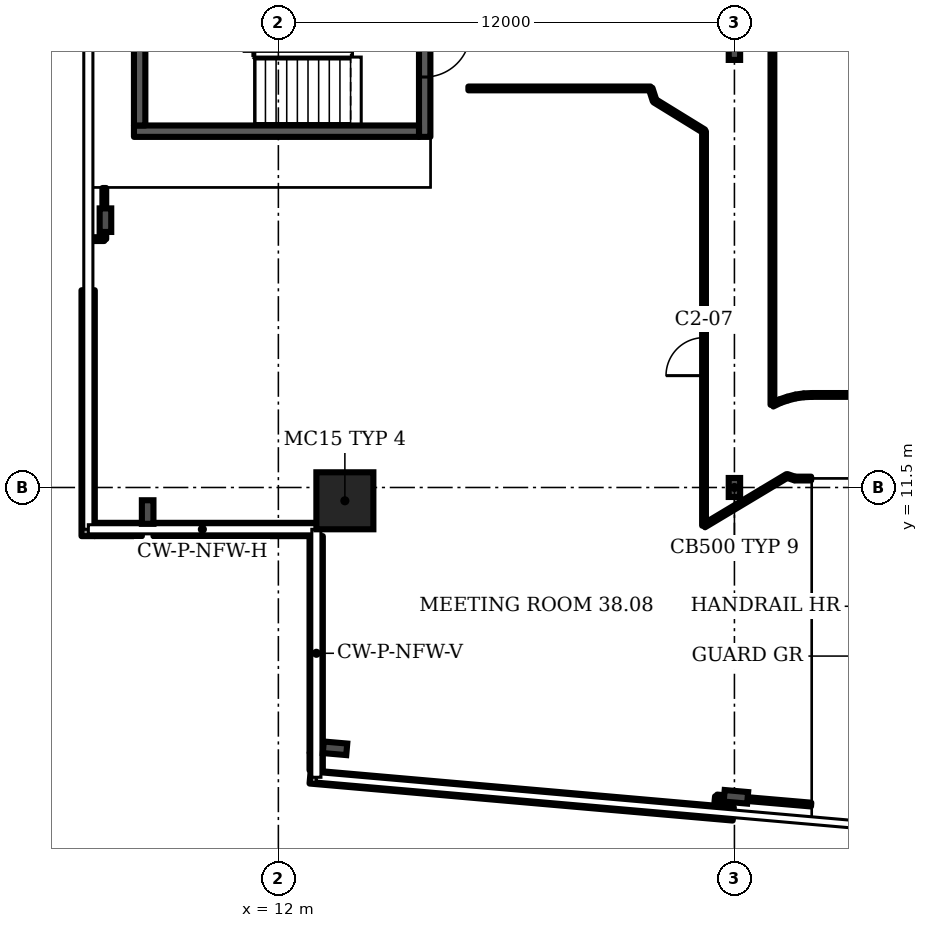
"""IFC4 building model, lengths in metres.
Left out: names, types, materials, properties, quantities, classifications, styles, units other than length and angle.
Written with IfcOpenShell. Run it as: python <this file> out.ifc"""

import sys

from ifc_helpers import new_model, si_unit, direction, frame, frame_2d, origin, origin_2d, place, context, subcontext, project, spatial, rectangle, i_section, extrude, element, fill, save


model = new_model("IFC4")
c1 = context("Model", 3, precision=1e-05, world=origin(), true_north=direction((0.0, 1.0)))
c2 = subcontext(c1, "Body", "Model", "MODEL_VIEW")
j1 = project(units=[si_unit("LENGTHUNIT", "METRE"), si_unit("PLANEANGLEUNIT", "RADIAN")], contexts=[c1])
p1 = place(None, origin())
s1 = spatial("IfcSite", under=j1, at=p1, CompositionType="ELEMENT")
p2 = place(p1, origin())
s2 = spatial("IfcBuilding", under=s1, at=p2, CompositionType="ELEMENT")
p3 = place(p2, frame((0.0, 0.0, 159.1)))
s3 = spatial("IfcBuildingStorey", under=s2, at=p3, CompositionType="ELEMENT", Elevation=159.1)
p4 = place(p3, frame((13.75, 11.15, 0.0), z_axis=(0.0, 0.0, 1.0), x_axis=(1.0, 0.0, 0.0)))
e1 = element("IfcColumn", 1, at=p4, inside=s3, PredefinedType="COLUMN", context=c2, shape_type="SweptSolid", body=[
    extrude(rectangle(XDim=1.5, YDim=1.5, at=origin_2d()), origin(), (0.0, 0.0, 1.0), 3.6),
])
for number, where, z_axis, x_axis in (
    (2, (13.491, 4.637, 0.0), (0.0, 0.0, 1.0), (-0.087, -0.996, 0.0)),
    (3, (24.039, 3.361, 0.0), (0.0, 0.0, 1.0), (-0.087, -0.996, 0.0)),
    (4, (7.45, 18.533, 0.0), (0.0, 0.0, 1.0), (-1.0, 0.0, 0.0)),
    (5, (8.561, 10.854, 0.0), (0.0, 0.0, 1.0), (-1.0, 0.0, 0.0)),
):
    element("IfcColumn", number, at=place(p3, frame(where, z_axis=z_axis, x_axis=x_axis)), inside=s3, PredefinedType="COLUMN", context=c2, shape_type="SweptSolid", body=[
        extrude(i_section(OverallWidth=0.305, OverallDepth=0.62, WebThickness=0.021, FlangeThickness=0.04, FilletRadius=0.027, at=origin_2d()), origin(), (0.0, 0.0, 1.0), 3.6),
    ])
for number, where, z_axis, x_axis in (
    (6, (24.0, 11.5, 0.0), (0.0, 0.0, 1.0), (1.0, 0.0, 0.0)),
    (7, (24.0, 23.0, 0.0), (0.0, 0.0, 1.0), (1.0, 0.0, 0.0)),
):
    element("IfcColumn", number, at=place(p3, frame(where, z_axis=z_axis, x_axis=x_axis)), inside=s3, PredefinedType="COLUMN", context=c2, shape_type="SweptSolid", body=[
        extrude(i_section(OverallWidth=0.3, OverallDepth=0.5, WebThickness=0.014, FlangeThickness=0.028, FilletRadius=0.027, at=origin_2d()), origin(), (0.0, 0.0, 1.0), 3.6),
    ])
p5 = place(p3, frame((12.835, 3.885, 0.0), z_axis=(0.0, 0.0, 1.0), x_axis=(0.996199, -0.087154, 0.0)))
e8 = element("IfcWall", 8, at=p5, inside=s3, PredefinedType="SOLIDWALL", context=c2, shape_type="SweptSolid", body=[
    extrude(rectangle(XDim=11.177, YDim=0.35, at=frame_2d((5.588, 0.0))), origin(), (0.0, 0.0, 1.0), 1.0),
])
p6 = place(p3, frame((6.995, 16.69, 0.0), z_axis=(0.0, 0.0, 1.0), x_axis=(0.0, -1.0, 0.0)))
e9 = element("IfcWall", 9, at=p6, inside=s3, PredefinedType="SOLIDWALL", context=c2, shape_type="SweptSolid", body=[
    extrude(rectangle(XDim=6.47, YDim=0.35, at=frame_2d((3.235, 0.0))), origin(), (0.0, 0.0, 1.0), 1.0),
])
p7 = place(p3, frame((7.17, 10.395, 0.0), z_axis=(0.0, 0.0, 1.0), x_axis=(1.0, 0.0, 0.0)))
e10 = element("IfcWall", 10, at=p7, inside=s3, PredefinedType="SOLIDWALL", context=c2, shape_type="SweptSolid", body=[
    extrude(rectangle(XDim=1.238, YDim=0.35, at=frame_2d((0.619, 0.0))), origin(), (0.0, 0.0, 1.0), 1.0),
])
p8 = place(p3, frame((8.713, 10.395, 0.0), z_axis=(0.0, 0.0, 1.0), x_axis=(1.0, 0.0, 0.0)))
e11 = element("IfcWall", 11, at=p8, inside=s3, PredefinedType="SOLIDWALL", context=c2, shape_type="SweptSolid", body=[
    extrude(rectangle(XDim=4.287, YDim=0.35, at=frame_2d((2.143, 0.0))), origin(), (0.0, 0.0, 1.0), 1.0),
])
p9 = place(p3, frame((12.995, 10.22, 0.0), z_axis=(0.0, 0.0, 1.0), x_axis=(0.0, -1.0, 0.0)))
e12 = element("IfcWall", 12, at=p9, inside=s3, PredefinedType="SOLIDWALL", context=c2, shape_type="SweptSolid", body=[
    extrude(rectangle(XDim=5.693, YDim=0.35, at=frame_2d((2.847, 0.0))), origin(), (0.0, 0.0, 1.0), 1.0),
])
p10 = place(p3, frame((12.995, 4.512, 0.0), z_axis=(0.0, 0.0, 1.0), x_axis=(0.0, -1.0, 0.0)))
e13 = element("IfcWall", 13, at=p10, inside=s3, PredefinedType="SOLIDWALL", context=c2, shape_type="SweptSolid", body=[
    extrude(rectangle(XDim=0.454, YDim=0.35, at=frame_2d((0.227, 0.0))), origin(), (0.0, 0.0, 1.0), 1.0),
])
p11 = place(p3, frame((15.85, 20.725, 0.0), z_axis=(0.0, 0.0, 1.0), x_axis=(0.0, 1.0, 0.0)))
e14 = element("IfcWall", 14, at=p11, inside=s3, PredefinedType="SHEAR", context=c2, shape_type="SweptSolid", body=[
    extrude(rectangle(XDim=4.35, YDim=0.3, at=frame_2d((2.175, 0.0))), origin(), (0.0, 0.0, 1.0), 3.2),
])
p12 = place(p11, frame((1.575, 0.0, 0.0)))
e15 = element("IfcOpeningElement", 15, at=p12, cuts=e14, PredefinedType="OPENING", context=c2, shape_type="SweptSolid", body=[
    extrude(rectangle(XDim=1.2, YDim=2.1, at=frame_2d((0.6, 1.05))), frame((0.0, 0.16, 0.0), z_axis=(0.0, -1.0, 0.0), x_axis=(1.0, 0.0, 0.0)), (0.0, 0.0, 1.0), 0.32),
])
p13 = place(p3, frame((7.02, 18.035, 0.0), z_axis=(0.0, 0.0, 1.0), x_axis=(1.0, 0.0, 0.0)))
e16 = element("IfcWall", 16, at=p13, inside=s3, PredefinedType="PARTITIONING", context=c2, shape_type="SweptSolid", body=[
    extrude(rectangle(XDim=0.4, YDim=0.1, at=frame_2d((0.2, 0.0))), origin(), (0.0, 0.0, 1.0), 3.2),
])
p14 = place(p3, frame((7.42, 18.035, 0.0), z_axis=(0.0, 0.0, 1.0), x_axis=(0.0, 1.0, 0.0)))
e17 = element("IfcWall", 17, at=p14, inside=s3, PredefinedType="PARTITIONING", context=c2, shape_type="SweptSolid", body=[
    extrude(rectangle(XDim=1.345, YDim=0.1, at=frame_2d((0.672, 0.0))), origin(), (0.0, 0.0, 1.0), 2.58),
])
p15 = place(p3, frame((17.0, 22.0, 0.0), z_axis=(0.0, 0.0, 1.0), x_axis=(1.0, 0.0, 0.0)))
e18 = element("IfcWall", 18, at=p15, inside=s3, PredefinedType="PARTITIONING", context=c2, shape_type="SweptSolid", body=[
    extrude(rectangle(XDim=4.795, YDim=0.1, at=frame_2d((2.397, 0.0))), origin(), (0.0, 0.0, 1.0), 3.2),
])
p16 = place(p3, frame((21.9, 21.675, 0.0), z_axis=(0.0, 0.0, 1.0), x_axis=(-0.30742, 0.951572, 0.0)))
e19 = element("IfcWall", 19, at=p16, inside=s3, PredefinedType="PARTITIONING", context=c2, shape_type="SweptSolid", body=[
    extrude(rectangle(XDim=0.342, YDim=0.1, at=frame_2d((0.171, 0.0))), origin(), (0.0, 0.0, 1.0), 3.2),
])
p17 = place(p3, frame((23.2, 20.875, 0.0), z_axis=(0.0, 0.0, 1.0), x_axis=(-0.851649, 0.524104, 0.0)))
e20 = element("IfcWall", 20, at=p17, inside=s3, PredefinedType="PARTITIONING", context=c2, shape_type="SweptSolid", body=[
    extrude(rectangle(XDim=1.527, YDim=0.1, at=frame_2d((0.763, 0.0))), origin(), (0.0, 0.0, 1.0), 3.2),
])
p18 = place(p3, frame((23.2, 10.495, 0.0), z_axis=(0.0, 0.0, 1.0), x_axis=(0.857707, 0.514145, 0.0)))
e21 = element("IfcWall", 21, at=p18, inside=s3, PredefinedType="PARTITIONING", context=c2, shape_type="SweptSolid", body=[
    extrude(rectangle(XDim=2.548, YDim=0.1, at=frame_2d((1.274, 0.0))), origin(), (0.0, 0.0, 1.0), 3.2),
])
p19 = place(p3, frame((23.2, 10.495, 0.0), z_axis=(0.0, 0.0, 1.0), x_axis=(0.0, 1.0, 0.0)))
e22 = element("IfcWall", 22, at=p19, inside=s3, PredefinedType="PARTITIONING", context=c2, shape_type="SweptSolid", body=[
    extrude(rectangle(XDim=10.38, YDim=0.1, at=frame_2d((5.19, 0.0))), origin(), (0.0, 0.0, 1.0), 3.2),
])
p20 = place(p19, frame((3.948, 0.0, 0.0)))
e23 = element("IfcOpeningElement", 23, at=p20, cuts=e22, PredefinedType="OPENING", context=c2, shape_type="SweptSolid", body=[
    extrude(rectangle(XDim=1.0, YDim=2.1, at=frame_2d((0.5, 1.05))), frame((0.0, 0.06, 0.0), z_axis=(0.0, -1.0, 0.0), x_axis=(1.0, 0.0, 0.0)), (0.0, 0.0, 1.0), 0.12),
])
p21 = place(p3, frame((23.502, 2.976, 0.0), z_axis=(0.0, 0.0, 1.0), x_axis=(0.095654, 0.995419, 0.0)))
e24 = element("IfcWall", 24, at=p21, inside=s3, PredefinedType="PARTITIONING", context=c2, shape_type="SweptSolid", body=[
    extrude(rectangle(XDim=0.396, YDim=0.1, at=frame_2d((0.198, 0.0))), origin(), (0.0, 0.0, 1.0), 3.2),
])
p22 = place(p3, frame((25.0, 13.675, 0.0), z_axis=(0.0, 0.0, 1.0), x_axis=(0.0, 1.0, 0.0)))
e25 = element("IfcWall", 25, at=p22, inside=s3, PredefinedType="PARTITIONING", context=c2, shape_type="SweptSolid", body=[
    extrude(rectangle(XDim=11.825, YDim=0.1, at=frame_2d((5.913, 0.0))), origin(), (0.0, 0.0, 1.0), 3.2),
])
p23 = place(p3, frame((25.0, 13.675, 0.0), z_axis=(0.0, 0.0, 1.0), x_axis=(0.899103, 0.437736, 0.0)))
e26 = element("IfcWall", 26, at=p23, inside=s3, PredefinedType="PARTITIONING", context=c2, shape_type="SweptSolid", body=[
    extrude(rectangle(XDim=0.217, YDim=0.1, at=frame_2d((0.108, 0.0))), origin(), (0.0, 0.0, 1.0), 3.2),
])
p24 = place(p3, frame((25.195, 13.77, 0.0), z_axis=(0.0, 0.0, 1.0), x_axis=(0.94617, 0.32366, 0.0)))
e27 = element("IfcWall", 27, at=p24, inside=s3, PredefinedType="PARTITIONING", context=c2, shape_type="SweptSolid", body=[
    extrude(rectangle(XDim=0.217, YDim=0.1, at=frame_2d((0.108, 0.0))), origin(), (0.0, 0.0, 1.0), 3.2),
])
p25 = place(p3, frame((25.4, 13.84, 0.0), z_axis=(0.0, 0.0, 1.0), x_axis=(0.967508, 0.252833, 0.0)))
e28 = element("IfcWall", 28, at=p25, inside=s3, PredefinedType="PARTITIONING", context=c2, shape_type="SweptSolid", body=[
    extrude(rectangle(XDim=0.217, YDim=0.1, at=frame_2d((0.109, 0.0))), origin(), (0.0, 0.0, 1.0), 3.2),
])
p26 = place(p3, frame((25.59, 11.735, 0.0), z_axis=(0.0, 0.0, 1.0), x_axis=(1.0, 0.0, 0.0)))
e29 = element("IfcWall", 29, at=p26, inside=s3, PredefinedType="PARTITIONING", context=c2, shape_type="SweptSolid", body=[
    extrude(rectangle(XDim=0.429, YDim=0.1, at=frame_2d((0.215, 0.0))), origin(), (0.0, 0.0, 1.0), 3.2),
])
p27 = place(p3, frame((25.59, 11.735, 0.0), z_axis=(0.0, 0.0, 1.0), x_axis=(-0.946633, 0.322306, 0.0)))
e30 = element("IfcWall", 30, at=p27, inside=s3, PredefinedType="PARTITIONING", context=c2, shape_type="SweptSolid", body=[
    extrude(rectangle(XDim=0.217, YDim=0.1, at=frame_2d((0.108, 0.0))), origin(), (0.0, 0.0, 1.0), 3.2),
])
p28 = place(p3, frame((25.61, 13.895, 0.0), z_axis=(0.0, 0.0, 1.0), x_axis=(0.990372, 0.138427, 0.0)))
e31 = element("IfcWall", 31, at=p28, inside=s3, PredefinedType="PARTITIONING", context=c2, shape_type="SweptSolid", body=[
    extrude(rectangle(XDim=0.217, YDim=0.1, at=frame_2d((0.108, 0.0))), origin(), (0.0, 0.0, 1.0), 3.2),
])
p29 = place(p3, frame((25.825, 13.925, 0.0), z_axis=(0.0, 0.0, 1.0), x_axis=(0.998923, 0.046488, 0.0)))
e32 = element("IfcWall", 32, at=p29, inside=s3, PredefinedType="PARTITIONING", context=c2, shape_type="SweptSolid", body=[
    extrude(rectangle(XDim=0.215, YDim=0.1, at=frame_2d((0.108, 0.0))), origin(), (0.0, 0.0, 1.0), 3.2),
])
p30 = place(p3, frame((26.019, 3.157, 0.0), z_axis=(0.0, 0.0, 1.0), x_axis=(-0.996317, 0.085749, 0.0)))
e33 = element("IfcWall", 33, at=p30, inside=s3, PredefinedType="PARTITIONING", context=c2, shape_type="SweptSolid", body=[
    extrude(rectangle(XDim=2.489, YDim=0.1, at=frame_2d((1.244, 0.0))), origin(), (0.0, 0.0, 1.0), 2.58),
])
p31 = place(p3, frame((26.04, 13.935, 0.0), z_axis=(0.0, 0.0, 1.0), x_axis=(1.0, 0.0, 0.0)))
e34 = element("IfcWall", 34, at=p31, inside=s3, PredefinedType="PARTITIONING", context=c2, shape_type="SweptSolid", body=[
    extrude(rectangle(XDim=7.0, YDim=0.1, at=frame_2d((3.5, 0.0))), origin(), (0.0, 0.0, 1.0), 3.2),
])
p32 = place(p3, frame((8.2, 20.875, 0.0), z_axis=(0.0, 0.0, 1.0), x_axis=(1.0, 0.0, 0.0)))
e35 = element("IfcWall", 35, at=p32, inside=s3, PredefinedType="SHEAR", context=c2, shape_type="SweptSolid", body=[
    extrude(rectangle(XDim=7.5, YDim=0.3, at=frame_2d((3.75, 0.0))), origin(), (0.0, 0.0, 1.0), 3.2),
])
p33 = place(p3, frame((8.35, 21.025, 0.0), z_axis=(0.0, 0.0, 1.0), x_axis=(0.0, 1.0, 0.0)))
e36 = element("IfcWall", 36, at=p33, inside=s3, PredefinedType="SHEAR", context=c2, shape_type="SweptSolid", body=[
    extrude(rectangle(XDim=3.75, YDim=0.3, at=frame_2d((1.875, 0.0))), origin(), (0.0, 0.0, 1.0), 3.2),
])
p34 = place(p12, origin())
e37 = element("IfcDoor", 37, at=p34, inside=s3, OperationType="SINGLE_SWING_RIGHT", PredefinedType="DOOR", context=c2, shape_type="SweptSolid", body=[
    extrude(rectangle(XDim=1.2, YDim=2.1, at=frame_2d((0.6, 1.05))), frame((0.0, 0.025, 0.0), z_axis=(0.0, -1.0, 0.0), x_axis=(1.0, 0.0, 0.0)), (0.0, 0.0, 1.0), 0.05),
])
fill(e15, e37)
p35 = place(p20, origin())
e38 = element("IfcDoor", 38, at=p35, inside=s3, OperationType="SINGLE_SWING_LEFT", PredefinedType="DOOR", context=c2, shape_type="SweptSolid", body=[
    extrude(rectangle(XDim=1.0, YDim=2.1, at=frame_2d((0.5, 1.05))), frame((0.0, 0.025, 0.0), z_axis=(0.0, -1.0, 0.0), x_axis=(1.0, 0.0, 0.0)), (0.0, 0.0, 1.0), 0.05),
])
fill(e23, e38)
save(model, sys.argv[1])
